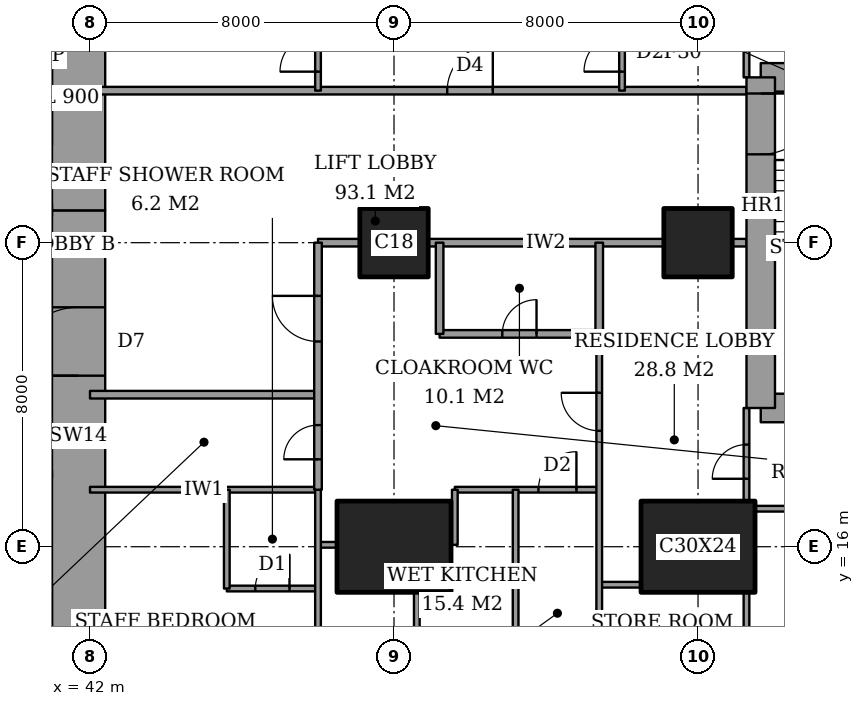
"""IFC4 building model, lengths in metres.
Left out: names, types, materials, properties, quantities, classifications, styles, units other than length and angle.
Written with IfcOpenShell. Run it as: python <this file> out.ifc"""

import sys

from ifc_helpers import new_model, si_unit, direction, frame, frame_2d, origin, origin_2d, place, context, subcontext, project, spatial, rectangle, extrude, element, fill, save


model = new_model("IFC4")
c1 = context("Model", 3, precision=1e-05, world=origin(), true_north=direction((0.0, 1.0)))
c2 = subcontext(c1, "Body", "Model", "MODEL_VIEW")
j1 = project(units=[si_unit("LENGTHUNIT", "METRE"), si_unit("PLANEANGLEUNIT", "RADIAN")], contexts=[c1])
p1 = place(None, origin())
s1 = spatial("IfcSite", under=j1, at=p1, CompositionType="ELEMENT")
p2 = place(p1, origin())
s2 = spatial("IfcBuilding", under=s1, at=p2, CompositionType="ELEMENT")
p3 = place(p2, frame((0.0, 0.0, 221.8)))
s3 = spatial("IfcBuildingStorey", under=s2, at=p3, CompositionType="ELEMENT", Elevation=221.8)
p4 = place(p3, frame((50.0, 16.0, 0.0), z_axis=(0.0, 0.0, 1.0), x_axis=(1.0, 0.0, 0.0)))
e1 = element("IfcColumn", 1, at=p4, inside=s3, PredefinedType="COLUMN", context=c2, shape_type="SweptSolid", body=[
    extrude(rectangle(XDim=3.0, YDim=2.4, at=origin_2d()), origin(), (0.0, 0.0, 1.0), 3.6),
])
p5 = place(p3, frame((50.0, 24.0, 0.0), z_axis=(0.0, 0.0, 1.0), x_axis=(1.0, 0.0, 0.0)))
e2 = element("IfcColumn", 2, at=p5, inside=s3, PredefinedType="COLUMN", context=c2, shape_type="SweptSolid", body=[
    extrude(rectangle(XDim=1.8, YDim=1.8, at=origin_2d()), origin(), (0.0, 0.0, 1.0), 3.6),
])
p6 = place(p3, frame((58.0, 16.0, 0.0), z_axis=(0.0, 0.0, 1.0), x_axis=(1.0, 0.0, 0.0)))
e3 = element("IfcColumn", 3, at=p6, inside=s3, PredefinedType="COLUMN", context=c2, shape_type="SweptSolid", body=[
    extrude(rectangle(XDim=3.0, YDim=2.4, at=origin_2d()), origin(), (0.0, 0.0, 1.0), 3.6),
])
p7 = place(p3, frame((58.0, 24.0, 0.0), z_axis=(0.0, 0.0, 1.0), x_axis=(1.0, 0.0, 0.0)))
e4 = element("IfcColumn", 4, at=p7, inside=s3, PredefinedType="COLUMN", context=c2, shape_type="SweptSolid", body=[
    extrude(rectangle(XDim=1.8, YDim=1.8, at=origin_2d()), origin(), (0.0, 0.0, 1.0), 3.6),
])
p8 = place(p3, frame((41.7, 13.0, 0.0), z_axis=(0.0, 0.0, 1.0), x_axis=(0.0, 1.0, 0.0)))
e5 = element("IfcWall", 5, at=p8, inside=s3, PredefinedType="SHEAR", context=c2, shape_type="SweptSolid", body=[
    extrude(rectangle(XDim=11.85, YDim=1.4, at=frame_2d((5.925, 0.0))), origin(), (0.0, 0.0, 1.0), 3.6),
])
p9 = place(p8, frame((7.5, 0.0, 0.0)))
e6 = element("IfcOpeningElement", 6, at=p9, cuts=e5, PredefinedType="OPENING", context=c2, shape_type="SweptSolid", body=[
    extrude(rectangle(XDim=1.8, YDim=2.4, at=frame_2d((0.9, 1.2))), frame((0.0, 0.71, 0.0), z_axis=(0.0, -1.0, 0.0), x_axis=(1.0, 0.0, 0.0)), (0.0, 0.0, 1.0), 1.42),
])
p10 = place(p3, frame((41.7, 24.85, 0.0), z_axis=(0.0, 0.0, 1.0), x_axis=(0.0, 1.0, 0.0)))
e7 = element("IfcWall", 7, at=p10, inside=s3, PredefinedType="SHEAR", context=c2, shape_type="SweptSolid", body=[
    extrude(rectangle(XDim=10.15, YDim=1.4, at=frame_2d((5.075, 0.0))), origin(), (0.0, 0.0, 1.0), 3.6),
])
for number, where, z_axis, x_axis in (
    (8, (59.65, 19.65, 0.0), (0.0, 0.0, 1.0), (1.0, 0.0, 0.0)),
    (9, (64.1, 28.35, 0.0), (0.0, 0.0, 1.0), (-1.0, 0.0, 0.0)),
):
    element("IfcWall", number, at=place(p3, frame(where, z_axis=z_axis, x_axis=x_axis)), inside=s3, PredefinedType="SHEAR", context=c2, shape_type="SweptSolid", body=[
        extrude(rectangle(XDim=4.45, YDim=0.75, at=frame_2d((2.225, 0.0))), origin(), (0.0, 0.0, 1.0), 3.6),
    ])
p11 = place(p3, frame((59.65, 28.35, 0.0), z_axis=(0.0, 0.0, 1.0), x_axis=(0.0, -1.0, 0.0)))
e10 = element("IfcWall", 10, at=p11, inside=s3, PredefinedType="SHEAR", context=c2, shape_type="SweptSolid", body=[
    extrude(rectangle(XDim=8.7, YDim=0.75, at=frame_2d((4.35, 0.0))), origin(), (0.0, 0.0, 1.0), 3.6),
])
p12 = place(p11, frame((0.425, 0.0, 0.0)))
e11 = element("IfcOpeningElement", 11, at=p12, cuts=e10, PredefinedType="OPENING", context=c2, shape_type="SweptSolid", body=[
    extrude(rectangle(XDim=1.6, YDim=2.1, at=frame_2d((0.8, 1.05))), frame((0.0, 0.385, 0.0), z_axis=(0.0, -1.0, 0.0), x_axis=(1.0, 0.0, 0.0)), (0.0, 0.0, 1.0), 0.77),
])
p13 = place(p3, frame((45.6, 14.9, 0.0), z_axis=(0.0, 0.0, 1.0), x_axis=(1.0, 0.0, 0.0)))
e12 = element("IfcWall", 12, at=p13, inside=s3, PredefinedType="PARTITIONING", context=c2, shape_type="SweptSolid", body=[
    extrude(rectangle(XDim=2.4, YDim=0.15, at=frame_2d((1.2, 0.0))), origin(), (0.0, 0.0, 1.0), 3.25),
])
p14 = place(p13, frame((0.75, 0.0, 0.0)))
e13 = element("IfcOpeningElement", 13, at=p14, cuts=e12, PredefinedType="OPENING", context=c2, shape_type="SweptSolid", body=[
    extrude(rectangle(XDim=0.9, YDim=2.1, at=frame_2d((0.45, 1.05))), frame((0.0, 0.085, 0.0), z_axis=(0.0, -1.0, 0.0), x_axis=(1.0, 0.0, 0.0)), (0.0, 0.0, 1.0), 0.17),
])
p15 = place(p3, frame((55.4, 15.0, 0.0), z_axis=(0.0, 0.0, 1.0), x_axis=(1.0, 0.0, 0.0)))
e14 = element("IfcWall", 14, at=p15, inside=s3, PredefinedType="PARTITIONING", context=c2, shape_type="SweptSolid", body=[
    extrude(rectangle(XDim=1.1, YDim=0.15, at=frame_2d((0.55, 0.0))), origin(), (0.0, 0.0, 1.0), 3.25),
])
p16 = place(p3, frame((48.0, 16.05, 0.0), z_axis=(0.0, 0.0, 1.0), x_axis=(1.0, 0.0, 0.0)))
e15 = element("IfcWall", 15, at=p16, inside=s3, PredefinedType="PARTITIONING", context=c2, shape_type="SweptSolid", body=[
    extrude(rectangle(XDim=0.5, YDim=0.15, at=frame_2d((0.25, 0.0))), origin(), (0.0, 0.0, 1.0), 3.25),
])
p17 = place(p3, frame((59.5, 17.0, 0.0), z_axis=(0.0, 0.0, 1.0), x_axis=(1.0, 0.0, 0.0)))
e16 = element("IfcWall", 16, at=p17, inside=s3, PredefinedType="PARTITIONING", context=c2, shape_type="SweptSolid", body=[
    extrude(rectangle(XDim=6.95, YDim=0.15, at=frame_2d((3.475, 0.0))), origin(), (0.0, 0.0, 1.0), 3.25),
])
p18 = place(p3, frame((42.0, 17.5, 0.0), z_axis=(0.0, 0.0, 1.0), x_axis=(1.0, 0.0, 0.0)))
e17 = element("IfcWall", 17, at=p18, inside=s3, PredefinedType="PARTITIONING", context=c2, shape_type="SweptSolid", body=[
    extrude(rectangle(XDim=6.0, YDim=0.15, at=frame_2d((3.0, 0.0))), origin(), (0.0, 0.0, 1.0), 3.25),
])
p19 = place(p3, frame((51.6, 17.5, 0.0), z_axis=(0.0, 0.0, 1.0), x_axis=(1.0, 0.0, 0.0)))
e18 = element("IfcWall", 18, at=p19, inside=s3, PredefinedType="PARTITIONING", context=c2, shape_type="SweptSolid", body=[
    extrude(rectangle(XDim=3.8, YDim=0.15, at=frame_2d((1.9, 0.0))), origin(), (0.0, 0.0, 1.0), 3.25),
])
p20 = place(p19, frame((2.2, 0.0, 0.0)))
e19 = element("IfcOpeningElement", 19, at=p20, cuts=e18, PredefinedType="OPENING", context=c2, shape_type="SweptSolid", body=[
    extrude(rectangle(XDim=1.0, YDim=2.1, at=frame_2d((0.5, 1.05))), frame((0.0, 0.085, 0.0), z_axis=(0.0, -1.0, 0.0), x_axis=(1.0, 0.0, 0.0)), (0.0, 0.0, 1.0), 0.17),
])
p21 = place(p3, frame((42.0, 20.0, 0.0), z_axis=(0.0, 0.0, 1.0), x_axis=(1.0, 0.0, 0.0)))
e20 = element("IfcWall", 20, at=p21, inside=s3, PredefinedType="PARTITIONING", context=c2, shape_type="SweptSolid", body=[
    extrude(rectangle(XDim=6.0, YDim=0.2, at=frame_2d((3.0, 0.0))), origin(), (0.0, 0.0, 1.0), 3.25),
])
p22 = place(p3, frame((51.2, 21.6, 0.0), z_axis=(0.0, 0.0, 1.0), x_axis=(1.0, 0.0, 0.0)))
e21 = element("IfcWall", 21, at=p22, inside=s3, PredefinedType="PARTITIONING", context=c2, shape_type="SweptSolid", body=[
    extrude(rectangle(XDim=4.2, YDim=0.2, at=frame_2d((2.1, 0.0))), origin(), (0.0, 0.0, 1.0), 3.25),
])
p23 = place(p22, frame((1.65, 0.0, 0.0)))
e22 = element("IfcOpeningElement", 22, at=p23, cuts=e21, PredefinedType="OPENING", context=c2, shape_type="SweptSolid", body=[
    extrude(rectangle(XDim=0.9, YDim=2.1, at=frame_2d((0.45, 1.05))), frame((0.0, 0.11, 0.0), z_axis=(0.0, -1.0, 0.0), x_axis=(1.0, 0.0, 0.0)), (0.0, 0.0, 1.0), 0.22),
])
p24 = place(p3, frame((48.0, 24.0, 0.0), z_axis=(0.0, 0.0, 1.0), x_axis=(1.0, 0.0, 0.0)))
e23 = element("IfcWall", 23, at=p24, inside=s3, PredefinedType="PARTITIONING", context=c2, shape_type="SweptSolid", body=[
    extrude(rectangle(XDim=1.1, YDim=0.2, at=frame_2d((0.55, 0.0))), origin(), (0.0, 0.0, 1.0), 3.25),
])
p25 = place(p3, frame((50.9, 24.0, 0.0), z_axis=(0.0, 0.0, 1.0), x_axis=(1.0, 0.0, 0.0)))
e24 = element("IfcWall", 24, at=p25, inside=s3, PredefinedType="PARTITIONING", context=c2, shape_type="SweptSolid", body=[
    extrude(rectangle(XDim=6.2, YDim=0.2, at=frame_2d((3.1, 0.0))), origin(), (0.0, 0.0, 1.0), 3.25),
])
p26 = place(p3, frame((58.9, 24.0, 0.0), z_axis=(0.0, 0.0, 1.0), x_axis=(1.0, 0.0, 0.0)))
e25 = element("IfcWall", 25, at=p26, inside=s3, PredefinedType="PARTITIONING", context=c2, shape_type="SweptSolid", body=[
    extrude(rectangle(XDim=0.375, YDim=0.2, at=frame_2d((0.188, 0.0))), origin(), (0.0, 0.0, 1.0), 3.25),
])
p27 = place(p3, frame((42.0, 28.0, 0.0), z_axis=(0.0, 0.0, 1.0), x_axis=(1.0, 0.0, 0.0)))
e26 = element("IfcWall", 26, at=p27, inside=s3, PredefinedType="PARTITIONING", context=c2, shape_type="SweptSolid", body=[
    extrude(rectangle(XDim=17.275, YDim=0.2, at=frame_2d((8.637, 0.0))), origin(), (0.0, 0.0, 1.0), 3.25),
])
p28 = place(p27, frame((9.4, 0.0, 0.0)))
e27 = element("IfcOpeningElement", 27, at=p28, cuts=e26, PredefinedType="OPENING", context=c2, shape_type="SweptSolid", body=[
    extrude(rectangle(XDim=1.2, YDim=2.4, at=frame_2d((0.6, 1.2))), frame((0.0, 0.11, 0.0), z_axis=(0.0, -1.0, 0.0), x_axis=(1.0, 0.0, 0.0)), (0.0, 0.0, 1.0), 0.22),
])
p29 = place(p3, frame((45.6, 14.9, 0.0), z_axis=(0.0, 0.0, 1.0), x_axis=(0.0, 1.0, 0.0)))
e28 = element("IfcWall", 28, at=p29, inside=s3, PredefinedType="PARTITIONING", context=c2, shape_type="SweptSolid", body=[
    extrude(rectangle(XDim=2.6, YDim=0.15, at=frame_2d((1.3, 0.0))), origin(), (0.0, 0.0, 1.0), 3.25),
])
p30 = place(p3, frame((48.0, 17.5, 0.0), z_axis=(0.0, 0.0, 1.0), x_axis=(0.0, 1.0, 0.0)))
e29 = element("IfcWall", 29, at=p30, inside=s3, PredefinedType="PARTITIONING", context=c2, shape_type="SweptSolid", body=[
    extrude(rectangle(XDim=6.5, YDim=0.2, at=frame_2d((3.25, 0.0))), origin(), (0.0, 0.0, 1.0), 3.25),
])
p31 = place(p30, frame((3.9, 0.0, 0.0)))
e30 = element("IfcOpeningElement", 30, at=p31, cuts=e29, PredefinedType="OPENING", context=c2, shape_type="SweptSolid", body=[
    extrude(rectangle(XDim=1.2, YDim=2.4, at=frame_2d((0.6, 1.2))), frame((0.0, 0.11, 0.0), z_axis=(0.0, -1.0, 0.0), x_axis=(1.0, 0.0, 0.0)), (0.0, 0.0, 1.0), 0.22),
])
p32 = place(p30, frame((0.8, 0.0, 0.0)))
e31 = element("IfcOpeningElement", 31, at=p32, cuts=e29, PredefinedType="OPENING", context=c2, shape_type="SweptSolid", body=[
    extrude(rectangle(XDim=0.9, YDim=2.1, at=frame_2d((0.45, 1.05))), frame((0.0, 0.11, 0.0), z_axis=(0.0, -1.0, 0.0), x_axis=(1.0, 0.0, 0.0)), (0.0, 0.0, 1.0), 0.22),
])
p33 = place(p3, frame((48.0, 11.0, 0.0), z_axis=(0.0, 0.0, 1.0), x_axis=(0.0, 1.0, 0.0)))
e32 = element("IfcWall", 32, at=p33, inside=s3, PredefinedType="PARTITIONING", context=c2, shape_type="SweptSolid", body=[
    extrude(rectangle(XDim=6.5, YDim=0.15, at=frame_2d((3.25, 0.0))), origin(), (0.0, 0.0, 1.0), 3.25),
])
p34 = place(p3, frame((48.0, 28.0, 0.0), z_axis=(0.0, 0.0, 1.0), x_axis=(0.0, 1.0, 0.0)))
e33 = element("IfcWall", 33, at=p34, inside=s3, PredefinedType="PARTITIONING", context=c2, shape_type="SweptSolid", body=[
    extrude(rectangle(XDim=9.4, YDim=0.15, at=frame_2d((4.7, 0.0))), origin(), (0.0, 0.0, 1.0), 3.25),
])
p35 = place(p34, frame((0.5, 0.0, 0.0)))
e34 = element("IfcOpeningElement", 34, at=p35, cuts=e33, PredefinedType="OPENING", context=c2, shape_type="SweptSolid", body=[
    extrude(rectangle(XDim=1.0, YDim=2.1, at=frame_2d((0.5, 1.05))), frame((0.0, 0.085, 0.0), z_axis=(0.0, -1.0, 0.0), x_axis=(1.0, 0.0, 0.0)), (0.0, 0.0, 1.0), 0.17),
])
p36 = place(p3, frame((50.6, 11.0, 0.0), z_axis=(0.0, 0.0, 1.0), x_axis=(0.0, 1.0, 0.0)))
e35 = element("IfcWall", 35, at=p36, inside=s3, PredefinedType="PARTITIONING", context=c2, shape_type="SweptSolid", body=[
    extrude(rectangle(XDim=3.8, YDim=0.15, at=frame_2d((1.9, 0.0))), origin(), (0.0, 0.0, 1.0), 3.25),
])
p37 = place(p3, frame((51.2, 21.6, 0.0), z_axis=(0.0, 0.0, 1.0), x_axis=(0.0, 1.0, 0.0)))
e36 = element("IfcWall", 36, at=p37, inside=s3, PredefinedType="PARTITIONING", context=c2, shape_type="SweptSolid", body=[
    extrude(rectangle(XDim=2.4, YDim=0.2, at=frame_2d((1.2, 0.0))), origin(), (0.0, 0.0, 1.0), 3.25),
])
p38 = place(p3, frame((51.6, 16.05, 0.0), z_axis=(0.0, 0.0, 1.0), x_axis=(0.0, 1.0, 0.0)))
e37 = element("IfcWall", 37, at=p38, inside=s3, PredefinedType="PARTITIONING", context=c2, shape_type="SweptSolid", body=[
    extrude(rectangle(XDim=1.45, YDim=0.15, at=frame_2d((0.725, 0.0))), origin(), (0.0, 0.0, 1.0), 3.25),
])
p39 = place(p3, frame((53.2, 11.0, 0.0), z_axis=(0.0, 0.0, 1.0), x_axis=(0.0, 1.0, 0.0)))
e38 = element("IfcWall", 38, at=p39, inside=s3, PredefinedType="PARTITIONING", context=c2, shape_type="SweptSolid", body=[
    extrude(rectangle(XDim=6.5, YDim=0.15, at=frame_2d((3.25, 0.0))), origin(), (0.0, 0.0, 1.0), 3.25),
])
p40 = place(p3, frame((55.4, 21.6, 0.0), z_axis=(0.0, 0.0, 1.0), x_axis=(0.0, 1.0, 0.0)))
e39 = element("IfcWall", 39, at=p40, inside=s3, PredefinedType="PARTITIONING", context=c2, shape_type="SweptSolid", body=[
    extrude(rectangle(XDim=2.4, YDim=0.2, at=frame_2d((1.2, 0.0))), origin(), (0.0, 0.0, 1.0), 3.25),
])
p41 = place(p3, frame((55.4, 11.0, 0.0), z_axis=(0.0, 0.0, 1.0), x_axis=(0.0, 1.0, 0.0)))
e40 = element("IfcWall", 40, at=p41, inside=s3, PredefinedType="PARTITIONING", context=c2, shape_type="SweptSolid", body=[
    extrude(rectangle(XDim=10.6, YDim=0.15, at=frame_2d((5.3, 0.0))), origin(), (0.0, 0.0, 1.0), 3.25),
])
p42 = place(p41, frame((8.05, 0.0, 0.0)))
e41 = element("IfcOpeningElement", 41, at=p42, cuts=e40, PredefinedType="OPENING", context=c2, shape_type="SweptSolid", body=[
    extrude(rectangle(XDim=1.0, YDim=2.1, at=frame_2d((0.5, 1.05))), frame((0.0, 0.085, 0.0), z_axis=(0.0, -1.0, 0.0), x_axis=(1.0, 0.0, 0.0)), (0.0, 0.0, 1.0), 0.17),
])
p43 = place(p3, frame((56.0, 28.0, 0.0), z_axis=(0.0, 0.0, 1.0), x_axis=(0.0, 1.0, 0.0)))
e42 = element("IfcWall", 42, at=p43, inside=s3, PredefinedType="PARTITIONING", context=c2, shape_type="SweptSolid", body=[
    extrude(rectangle(XDim=9.4, YDim=0.15, at=frame_2d((4.7, 0.0))), origin(), (0.0, 0.0, 1.0), 3.25),
])
p44 = place(p43, frame((0.5, 0.0, 0.0)))
e43 = element("IfcOpeningElement", 43, at=p44, cuts=e42, PredefinedType="OPENING", context=c2, shape_type="SweptSolid", body=[
    extrude(rectangle(XDim=1.0, YDim=2.1, at=frame_2d((0.5, 1.05))), frame((0.0, 0.085, 0.0), z_axis=(0.0, -1.0, 0.0), x_axis=(1.0, 0.0, 0.0)), (0.0, 0.0, 1.0), 0.17),
])
p45 = place(p3, frame((59.275, 11.0, 0.0), z_axis=(0.0, 0.0, 1.0), x_axis=(0.0, 1.0, 0.0)))
e44 = element("IfcWall", 44, at=p45, inside=s3, PredefinedType="PARTITIONING", context=c2, shape_type="SweptSolid", body=[
    extrude(rectangle(XDim=3.8, YDim=0.15, at=frame_2d((1.9, 0.0))), origin(), (0.0, 0.0, 1.0), 3.25),
])
p46 = place(p3, frame((59.275, 17.2, 0.0), z_axis=(0.0, 0.0, 1.0), x_axis=(0.0, 1.0, 0.0)))
e45 = element("IfcWall", 45, at=p46, inside=s3, PredefinedType="PARTITIONING", context=c2, shape_type="SweptSolid", body=[
    extrude(rectangle(XDim=2.45, YDim=0.15, at=frame_2d((1.225, 0.0))), origin(), (0.0, 0.0, 1.0), 3.25),
])
p47 = place(p46, frame((0.587, 0.0, 0.0)))
e46 = element("IfcOpeningElement", 46, at=p47, cuts=e45, PredefinedType="OPENING", context=c2, shape_type="SweptSolid", body=[
    extrude(rectangle(XDim=0.9, YDim=2.1, at=frame_2d((0.45, 1.05))), frame((0.0, 0.085, 0.0), z_axis=(0.0, -1.0, 0.0), x_axis=(1.0, 0.0, 0.0)), (0.0, 0.0, 1.0), 0.17),
])
p48 = place(p3, frame((59.275, 28.35, 0.0), z_axis=(0.0, 0.0, 1.0), x_axis=(0.0, 1.0, 0.0)))
e47 = element("IfcWall", 47, at=p48, inside=s3, PredefinedType="PARTITIONING", context=c2, shape_type="SweptSolid", body=[
    extrude(rectangle(XDim=2.45, YDim=0.15, at=frame_2d((1.225, 0.0))), origin(), (0.0, 0.0, 1.0), 3.25),
])
p49 = place(p48, frame((0.962, 0.0, 0.0)))
e48 = element("IfcOpeningElement", 48, at=p49, cuts=e47, PredefinedType="OPENING", context=c2, shape_type="SweptSolid", body=[
    extrude(rectangle(XDim=0.9, YDim=2.1, at=frame_2d((0.45, 1.05))), frame((0.0, 0.085, 0.0), z_axis=(0.0, -1.0, 0.0), x_axis=(1.0, 0.0, 0.0)), (0.0, 0.0, 1.0), 0.17),
])
p50 = place(p3, frame((28.3, 17.9, 0.0), z_axis=(0.0, 0.0, 1.0), x_axis=(1.0, 0.0, 0.0)))
e49 = element("IfcWall", 49, at=p50, inside=s3, PredefinedType="PARTITIONING", context=c2, shape_type="SweptSolid", body=[
    extrude(rectangle(XDim=12.7, YDim=0.2, at=frame_2d((6.35, 0.0))), origin(), (0.0, 0.0, 1.0), 3.6),
])
p51 = place(p50, frame((1.05, 0.0, 0.0)))
e50 = element("IfcOpeningElement", 50, at=p51, cuts=e49, PredefinedType="OPENING", context=c2, shape_type="SweptSolid", body=[
    extrude(rectangle(XDim=0.9, YDim=2.1, at=frame_2d((0.45, 1.05))), frame((0.0, 0.11, 0.0), z_axis=(0.0, -1.0, 0.0), x_axis=(1.0, 0.0, 0.0)), (0.0, 0.0, 1.0), 0.22),
])
p52 = place(p50, frame((10.6, 0.0, 0.0)))
e51 = element("IfcOpeningElement", 51, at=p52, cuts=e49, PredefinedType="OPENING", context=c2, shape_type="SweptSolid", body=[
    extrude(rectangle(XDim=1.2, YDim=2.1, at=frame_2d((0.6, 1.05))), frame((0.0, 0.11, 0.0), z_axis=(0.0, -1.0, 0.0), x_axis=(1.0, 0.0, 0.0)), (0.0, 0.0, 1.0), 0.22),
])
p53 = place(p47, origin())
e52 = element("IfcDoor", 52, at=p53, inside=s3, OperationType="SINGLE_SWING_RIGHT", PredefinedType="DOOR", context=c2, shape_type="SweptSolid", body=[
    extrude(rectangle(XDim=0.9, YDim=2.1, at=frame_2d((0.45, 1.05))), frame((0.0, 0.025, 0.0), z_axis=(0.0, -1.0, 0.0), x_axis=(1.0, 0.0, 0.0)), (0.0, 0.0, 1.0), 0.05),
])
fill(e46, e52)
p54 = place(p42, origin())
e53 = element("IfcDoor", 53, at=p54, inside=s3, OperationType="SINGLE_SWING_LEFT", PredefinedType="DOOR", context=c2, shape_type="SweptSolid", body=[
    extrude(rectangle(XDim=1.0, YDim=2.1, at=frame_2d((0.5, 1.05))), frame((0.0, 0.025, 0.0), z_axis=(0.0, -1.0, 0.0), x_axis=(1.0, 0.0, 0.0)), (0.0, 0.0, 1.0), 0.05),
])
fill(e41, e53)
p55 = place(p23, origin())
e54 = element("IfcDoor", 54, at=p55, inside=s3, OperationType="SINGLE_SWING_LEFT", PredefinedType="DOOR", context=c2, shape_type="SweptSolid", body=[
    extrude(rectangle(XDim=0.9, YDim=2.1, at=frame_2d((0.45, 1.05))), frame((0.0, 0.025, 0.0), z_axis=(0.0, -1.0, 0.0), x_axis=(1.0, 0.0, 0.0)), (0.0, 0.0, 1.0), 0.05),
])
fill(e22, e54)
p56 = place(p31, origin())
e55 = element("IfcDoor", 55, at=p56, inside=s3, OperationType="SINGLE_SWING_LEFT", PredefinedType="DOOR", context=c2, shape_type="SweptSolid", body=[
    extrude(rectangle(XDim=1.2, YDim=2.4, at=frame_2d((0.6, 1.2))), frame((0.0, 0.025, 0.0), z_axis=(0.0, -1.0, 0.0), x_axis=(1.0, 0.0, 0.0)), (0.0, 0.0, 1.0), 0.05),
])
fill(e30, e55)
p57 = place(p20, origin())
e56 = element("IfcDoor", 56, at=p57, inside=s3, OperationType="SINGLE_SWING_LEFT", PredefinedType="DOOR", context=c2, shape_type="SweptSolid", body=[
    extrude(rectangle(XDim=1.0, YDim=2.1, at=frame_2d((0.5, 1.05))), frame((0.0, 0.025, 0.0), z_axis=(0.0, -1.0, 0.0), x_axis=(1.0, 0.0, 0.0)), (0.0, 0.0, 1.0), 0.05),
])
fill(e19, e56)
p58 = place(p14, origin())
e57 = element("IfcDoor", 57, at=p58, inside=s3, OperationType="SINGLE_SWING_LEFT", PredefinedType="DOOR", context=c2, shape_type="SweptSolid", body=[
    extrude(rectangle(XDim=0.9, YDim=2.1, at=frame_2d((0.45, 1.05))), frame((0.0, 0.025, 0.0), z_axis=(0.0, -1.0, 0.0), x_axis=(1.0, 0.0, 0.0)), (0.0, 0.0, 1.0), 0.05),
])
fill(e13, e57)
p59 = place(p32, origin())
e58 = element("IfcDoor", 58, at=p59, inside=s3, OperationType="SINGLE_SWING_RIGHT", PredefinedType="DOOR", context=c2, shape_type="SweptSolid", body=[
    extrude(rectangle(XDim=0.9, YDim=2.1, at=frame_2d((0.45, 1.05))), frame((0.0, 0.025, 0.0), z_axis=(0.0, -1.0, 0.0), x_axis=(1.0, 0.0, 0.0)), (0.0, 0.0, 1.0), 0.05),
])
fill(e31, e58)
p60 = place(p44, origin())
e59 = element("IfcDoor", 59, at=p60, inside=s3, OperationType="SINGLE_SWING_RIGHT", PredefinedType="DOOR", context=c2, shape_type="SweptSolid", body=[
    extrude(rectangle(XDim=1.0, YDim=2.1, at=frame_2d((0.5, 1.05))), frame((0.0, 0.025, 0.0), z_axis=(0.0, -1.0, 0.0), x_axis=(1.0, 0.0, 0.0)), (0.0, 0.0, 1.0), 0.05),
])
fill(e43, e59)
p61 = place(p28, origin())
e60 = element("IfcDoor", 60, at=p61, inside=s3, OperationType="SINGLE_SWING_LEFT", PredefinedType="DOOR", context=c2, shape_type="SweptSolid", body=[
    extrude(rectangle(XDim=1.2, YDim=2.4, at=frame_2d((0.6, 1.2))), frame((0.0, 0.025, 0.0), z_axis=(0.0, -1.0, 0.0), x_axis=(1.0, 0.0, 0.0)), (0.0, 0.0, 1.0), 0.05),
])
fill(e27, e60)
p62 = place(p35, origin())
e61 = element("IfcDoor", 61, at=p62, inside=s3, OperationType="SINGLE_SWING_RIGHT", PredefinedType="DOOR", context=c2, shape_type="SweptSolid", body=[
    extrude(rectangle(XDim=1.0, YDim=2.1, at=frame_2d((0.5, 1.05))), frame((0.0, 0.025, 0.0), z_axis=(0.0, -1.0, 0.0), x_axis=(1.0, 0.0, 0.0)), (0.0, 0.0, 1.0), 0.05),
])
fill(e34, e61)
p63 = place(p9, origin())
e62 = element("IfcDoor", 62, at=p63, inside=s3, OperationType="DOUBLE_DOOR_DOUBLE_SWING", PredefinedType="DOOR", context=c2, shape_type="SweptSolid", body=[
    extrude(rectangle(XDim=1.8, YDim=2.4, at=frame_2d((0.9, 1.2))), frame((0.0, 0.025, 0.0), z_axis=(0.0, -1.0, 0.0), x_axis=(1.0, 0.0, 0.0)), (0.0, 0.0, 1.0), 0.05),
])
fill(e6, e62)
p64 = place(p12, origin())
e63 = element("IfcDoor", 63, at=p64, inside=s3, OperationType="DOUBLE_DOOR_SINGLE_SWING", PredefinedType="DOOR", context=c2, shape_type="SweptSolid", body=[
    extrude(rectangle(XDim=1.6, YDim=2.1, at=frame_2d((0.8, 1.05))), frame((0.0, 0.025, 0.0), z_axis=(0.0, -1.0, 0.0), x_axis=(1.0, 0.0, 0.0)), (0.0, 0.0, 1.0), 0.05),
])
fill(e11, e63)
save(model, sys.argv[1])
